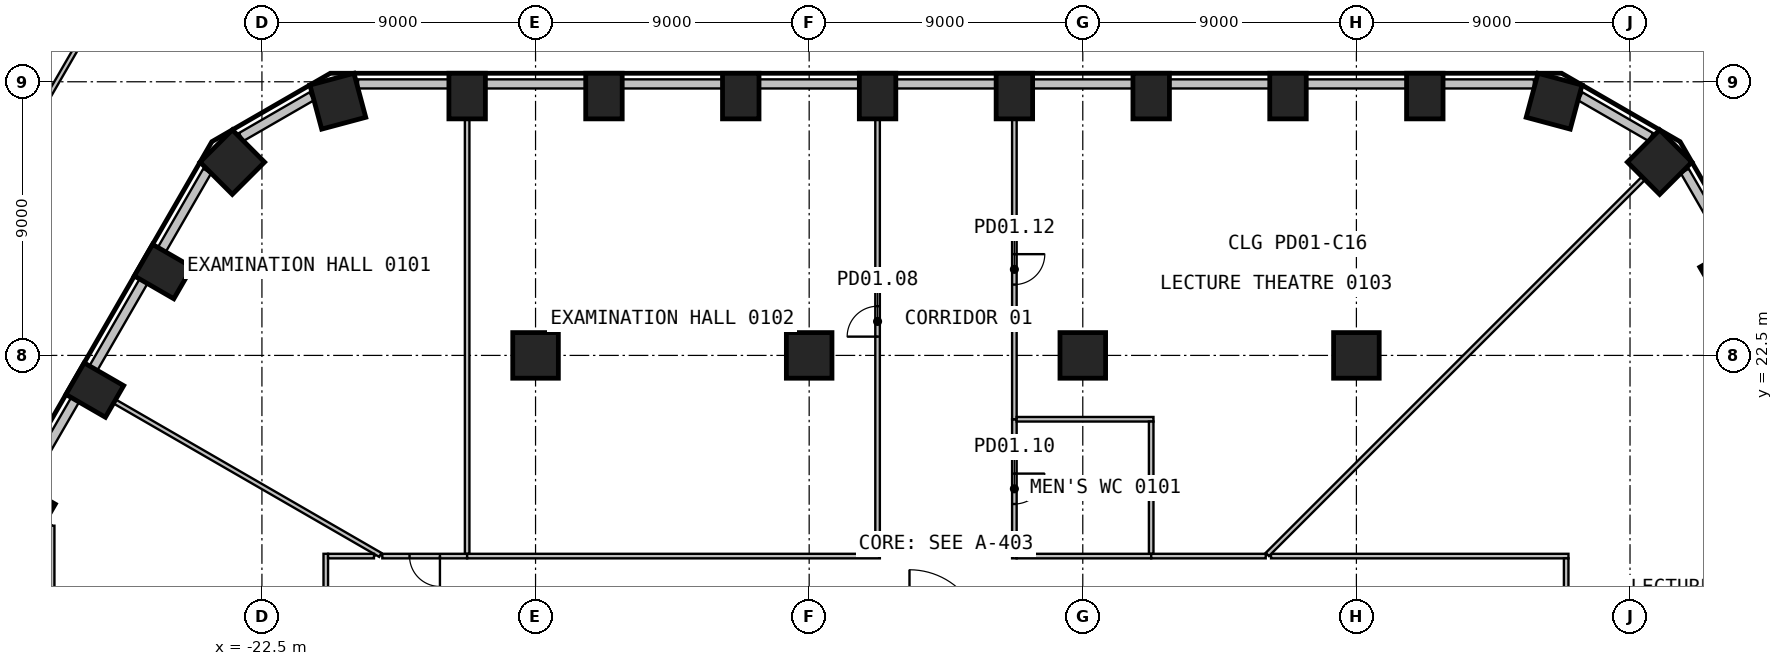
"""IFC4 building model, lengths in metres.
Left out: names, types, materials, properties, quantities, classifications, styles, units other than length and angle.
Written with IfcOpenShell. Run it as: python <this file> out.ifc"""

import sys

from ifc_helpers import new_model, si_unit, direction, frame, frame_2d, origin, origin_2d, place, context, subcontext, project, spatial, rectangle, circle, extrude, element, fill, save


model = new_model("IFC4")
c1 = context("Model", 3, precision=1e-05, world=origin(), true_north=direction((0.0, 1.0)))
c2 = subcontext(c1, "Body", "Model", "MODEL_VIEW")
j1 = project(units=[si_unit("LENGTHUNIT", "METRE"), si_unit("PLANEANGLEUNIT", "RADIAN")], contexts=[c1])
p1 = place(None, origin())
s1 = spatial("IfcSite", under=j1, at=p1, CompositionType="ELEMENT")
p2 = place(p1, origin())
s2 = spatial("IfcBuilding", under=s1, at=p2, CompositionType="ELEMENT")
p3 = place(p2, frame((0.0, 0.0, 6.0)))
s3 = spatial("IfcBuildingStorey", under=s2, at=p3, CompositionType="ELEMENT", Elevation=6.0)
p4 = place(p3, frame((25.748, 25.258, 0.0), z_axis=(0.0, 0.0, 1.0), x_axis=(-0.5, 0.866025403784, 0.0)))
e1 = element("IfcColumn", 1, at=p4, inside=s3, PredefinedType="COLUMN", context=c2, shape_type="SweptSolid", body=[
    extrude(rectangle(XDim=1.2, YDim=1.5, at=origin_2d()), origin(), (0.0, 0.0, 1.0), 4.4),
])
for number, where, z_axis, x_axis in (
    (2, (23.475, 28.857, 0.0), (0.0, 0.0, 1.0), (-0.707, 0.707, 0.0)),
    (3, (20.004, 30.861, 0.0), (0.0, 0.0, 1.0), (-0.966, 0.259, 0.0)),
):
    element("IfcColumn", number, at=place(p3, frame(where, z_axis=z_axis, x_axis=x_axis)), inside=s3, PredefinedType="COLUMN", context=c2, shape_type="SweptSolid", body=[
        extrude(rectangle(XDim=1.5, YDim=1.5, at=origin_2d()), origin(), (0.0, 0.0, 1.0), 4.4),
    ])
for number, where, z_axis, x_axis in (
    (4, (15.75, 31.03, 0.0), (0.0, 0.0, 1.0), (-1.0, 0.0, 0.0)),
    (5, (11.25, 31.03, 0.0), (0.0, 0.0, 1.0), (-1.0, 0.0, 0.0)),
    (6, (6.75, 31.03, 0.0), (0.0, 0.0, 1.0), (-1.0, 0.0, 0.0)),
    (7, (2.25, 31.03, 0.0), (0.0, 0.0, 1.0), (-1.0, 0.0, 0.0)),
    (8, (-2.25, 31.03, 0.0), (0.0, 0.0, 1.0), (-1.0, 0.0, 0.0)),
    (9, (-6.75, 31.03, 0.0), (0.0, 0.0, 1.0), (-1.0, 0.0, 0.0)),
    (10, (-11.25, 31.03, 0.0), (0.0, 0.0, 1.0), (-1.0, 0.0, 0.0)),
    (11, (-15.75, 31.03, 0.0), (0.0, 0.0, 1.0), (-1.0, 0.0, 0.0)),
):
    element("IfcColumn", number, at=place(p3, frame(where, z_axis=z_axis, x_axis=x_axis)), inside=s3, PredefinedType="COLUMN", context=c2, shape_type="SweptSolid", body=[
        extrude(rectangle(XDim=1.2, YDim=1.5, at=origin_2d()), origin(), (0.0, 0.0, 1.0), 4.4),
    ])
for number, where, z_axis, x_axis in (
    (12, (-20.004, 30.861, 0.0), (0.0, 0.0, 1.0), (-0.966, -0.259, 0.0)),
    (13, (-23.475, 28.857, 0.0), (0.0, 0.0, 1.0), (-0.707, -0.707, 0.0)),
):
    element("IfcColumn", number, at=place(p3, frame(where, z_axis=z_axis, x_axis=x_axis)), inside=s3, PredefinedType="COLUMN", context=c2, shape_type="SweptSolid", body=[
        extrude(rectangle(XDim=1.5, YDim=1.5, at=origin_2d()), origin(), (0.0, 0.0, 1.0), 4.4),
    ])
for number, where, z_axis, x_axis in (
    (14, (-25.748, 25.258, 0.0), (0.0, 0.0, 1.0), (-0.5, -0.866, 0.0)),
    (15, (-27.998, 21.361, 0.0), (0.0, 0.0, 1.0), (-0.5, -0.866, 0.0)),
    (16, (-30.248, 17.463, 0.0), (0.0, 0.0, 1.0), (-0.5, -0.866, 0.0)),
):
    element("IfcColumn", number, at=place(p3, frame(where, z_axis=z_axis, x_axis=x_axis)), inside=s3, PredefinedType="COLUMN", context=c2, shape_type="SweptSolid", body=[
        extrude(rectangle(XDim=1.2, YDim=1.5, at=origin_2d()), origin(), (0.0, 0.0, 1.0), 4.4),
    ])
for number, where, z_axis, x_axis in (
    (17, (-13.5, 22.5, 0.0), (0.0, 0.0, 1.0), (1.0, 0.0, 0.0)),
    (18, (-4.5, 22.5, 0.0), (0.0, 0.0, 1.0), (1.0, 0.0, 0.0)),
    (19, (4.5, 22.5, 0.0), (0.0, 0.0, 1.0), (1.0, 0.0, 0.0)),
    (20, (13.5, 22.5, 0.0), (0.0, 0.0, 1.0), (1.0, 0.0, 0.0)),
):
    element("IfcColumn", number, at=place(p3, frame(where, z_axis=z_axis, x_axis=x_axis)), inside=s3, PredefinedType="COLUMN", context=c2, shape_type="SweptSolid", body=[
        extrude(circle(Radius=0.75, at=origin_2d()), origin(), (0.0, 0.0, 1.0), 4.4),
    ])
p5 = place(p3, frame((25.794, 25.978, 0.0), z_axis=(0.0, 0.0, 1.0), x_axis=(-0.49999586137, 0.866027793211, 0.0)))
e21 = element("IfcWall", 21, at=p5, inside=s3, PredefinedType="SOLIDWALL", context=c2, shape_type="SweptSolid", body=[
    extrude(rectangle(XDim=2.989, YDim=0.3, at=frame_2d((1.494, 0.0))), origin(), (0.0, 0.0, 1.0), 4.4),
])
p6 = place(p3, frame((23.183, 29.682, 0.0), z_axis=(0.0, 0.0, 1.0), x_axis=(-0.866001915448, 0.500040680786, 0.0)))
e22 = element("IfcWall", 22, at=p6, inside=s3, PredefinedType="SOLIDWALL", context=c2, shape_type="SweptSolid", body=[
    extrude(rectangle(XDim=2.678, YDim=0.3, at=frame_2d((1.339, 0.0))), origin(), (0.0, 0.0, 1.0), 4.4),
])
p7 = place(p3, frame((19.339, 31.43, 0.0), z_axis=(0.0, 0.0, 1.0), x_axis=(-1.0, 0.0, 0.0)))
e23 = element("IfcWall", 23, at=p7, inside=s3, PredefinedType="SOLIDWALL", context=c2, shape_type="SweptSolid", body=[
    extrude(rectangle(XDim=2.989, YDim=0.3, at=frame_2d((1.494, 0.0))), origin(), (0.0, 0.0, 1.0), 4.4),
])
for number, where, z_axis, x_axis in (
    (24, (15.149, 31.43, 0.0), (0.0, 0.0, 1.0), (-1.0, 0.0, 0.0)),
    (25, (10.649, 31.43, 0.0), (0.0, 0.0, 1.0), (-1.0, 0.0, 0.0)),
    (26, (6.149, 31.43, 0.0), (0.0, 0.0, 1.0), (-1.0, 0.0, 0.0)),
    (27, (1.649, 31.43, 0.0), (0.0, 0.0, 1.0), (-1.0, 0.0, 0.0)),
    (28, (-2.851, 31.43, 0.0), (0.0, 0.0, 1.0), (-1.0, 0.0, 0.0)),
    (29, (-7.351, 31.43, 0.0), (0.0, 0.0, 1.0), (-1.0, 0.0, 0.0)),
    (30, (-11.851, 31.43, 0.0), (0.0, 0.0, 1.0), (-1.0, 0.0, 0.0)),
):
    element("IfcWall", number, at=place(p3, frame(where, z_axis=z_axis, x_axis=x_axis)), inside=s3, PredefinedType="SOLIDWALL", context=c2, shape_type="SweptSolid", body=[
        extrude(rectangle(XDim=3.299, YDim=0.3, at=frame_2d((1.649, 0.0))), origin(), (0.0, 0.0, 1.0), 4.4),
    ])
p8 = place(p3, frame((-16.351, 31.43, 0.0), z_axis=(0.0, 0.0, 1.0), x_axis=(-1.0, 0.0, 0.0)))
e31 = element("IfcWall", 31, at=p8, inside=s3, PredefinedType="SOLIDWALL", context=c2, shape_type="SweptSolid", body=[
    extrude(rectangle(XDim=2.989, YDim=0.3, at=frame_2d((1.494, 0.0))), origin(), (0.0, 0.0, 1.0), 4.4),
])
p9 = place(p3, frame((-20.864, 31.021, 0.0), z_axis=(0.0, 0.0, 1.0), x_axis=(-0.866001915448, -0.500040680786, 0.0)))
e32 = element("IfcWall", 32, at=p9, inside=s3, PredefinedType="SOLIDWALL", context=c2, shape_type="SweptSolid", body=[
    extrude(rectangle(XDim=2.678, YDim=0.3, at=frame_2d((1.339, 0.0))), origin(), (0.0, 0.0, 1.0), 4.4),
])
p10 = place(p3, frame((-24.299, 28.566, 0.0), z_axis=(0.0, 0.0, 1.0), x_axis=(-0.49999586137, -0.866027793211, 0.0)))
e33 = element("IfcWall", 33, at=p10, inside=s3, PredefinedType="SOLIDWALL", context=c2, shape_type="SweptSolid", body=[
    extrude(rectangle(XDim=2.989, YDim=0.3, at=frame_2d((1.494, 0.0))), origin(), (0.0, 0.0, 1.0), 4.4),
])
for number, where, z_axis, x_axis in (
    (34, (-26.394, 24.938, 0.0), (0.0, 0.0, 1.0), (-0.5, -0.866, 0.0)),
    (35, (-28.644, 21.041, 0.0), (0.0, 0.0, 1.0), (-0.5, -0.866, 0.0)),
):
    element("IfcWall", number, at=place(p3, frame(where, z_axis=z_axis, x_axis=x_axis)), inside=s3, PredefinedType="SOLIDWALL", context=c2, shape_type="SweptSolid", body=[
        extrude(rectangle(XDim=3.299, YDim=0.3, at=frame_2d((1.649, 0.0))), origin(), (0.0, 0.0, 1.0), 4.4),
    ])
p11 = place(p3, frame((-33.287, 24.501, 0.0), z_axis=(0.0, 0.0, 1.0), x_axis=(0.500064997195, 0.865987874384, 0.0)))
e36 = element("IfcWall", 36, at=p11, inside=s3, PredefinedType="PARTITIONING", context=c2, shape_type="SweptSolid", body=[
    extrude(rectangle(XDim=10.447, YDim=0.15, at=frame_2d((5.223, 0.0))), origin(), (0.0, 0.0, 1.0), 4.05),
])
p12 = place(p3, frame((-29.4, 16.899, 0.0), z_axis=(0.0, 0.0, 1.0), x_axis=(0.0, -1.0, 0.0)))
e37 = element("IfcWall", 37, at=p12, inside=s3, PredefinedType="PARTITIONING", context=c2, shape_type="SweptSolid", body=[
    extrude(rectangle(XDim=14.574, YDim=0.15, at=frame_2d((7.287, 0.0))), origin(), (0.0, 0.0, 1.0), 4.4),
])
p13 = place(p3, frame((-27.331, 20.976, 0.0), z_axis=(0.0, 0.0, 1.0), x_axis=(0.865988664976, -0.500063628085, 0.0)))
e38 = element("IfcWall", 38, at=p13, inside=s3, PredefinedType="PARTITIONING", context=c2, shape_type="SweptSolid", body=[
    extrude(rectangle(XDim=10.076, YDim=0.15, at=frame_2d((5.038, 0.0))), origin(), (0.0, 0.0, 1.0), 4.4),
])
p14 = place(p3, frame((-20.4, 15.975, 0.0), z_axis=(0.0, 0.0, 1.0), x_axis=(0.0, -1.0, 0.0)))
e39 = element("IfcWall", 39, at=p14, inside=s3, PredefinedType="PARTITIONING", context=c2, shape_type="SweptSolid", body=[
    extrude(rectangle(XDim=13.65, YDim=0.15, at=frame_2d((6.825, 0.0))), origin(), (0.0, 0.0, 1.0), 4.4),
])
p15 = place(p14, frame((6.325, 0.0, 0.0)))
e40 = element("IfcOpeningElement", 40, at=p15, cuts=e39, PredefinedType="OPENING", context=c2, shape_type="SweptSolid", body=[
    extrude(rectangle(XDim=1.0, YDim=2.1, at=frame_2d((0.5, 1.05))), frame((0.0, 0.085, 0.0), z_axis=(0.0, -1.0, 0.0), x_axis=(1.0, 0.0, 0.0)), (0.0, 0.0, 1.0), 0.17),
])
p16 = place(p3, frame((-18.815, 15.9, 0.0), z_axis=(0.0, 0.0, 1.0), x_axis=(-1.0, 0.0, 0.0)))
e41 = element("IfcWall", 41, at=p16, inside=s3, PredefinedType="PARTITIONING", context=c2, shape_type="SweptSolid", body=[
    extrude(rectangle(XDim=1.51, YDim=0.15, at=frame_2d((0.755, 0.0))), origin(), (0.0, 0.0, 1.0), 4.4),
])
p17 = place(p3, frame((-15.75, 15.9, 0.0), z_axis=(0.0, 0.0, 1.0), x_axis=(-1.0, 0.0, 0.0)))
e42 = element("IfcWall", 42, at=p17, inside=s3, PredefinedType="PARTITIONING", context=c2, shape_type="SweptSolid", body=[
    extrude(rectangle(XDim=2.79, YDim=0.15, at=frame_2d((1.395, 0.0))), origin(), (0.0, 0.0, 1.0), 4.4),
])
p18 = place(p17, frame((0.895, 0.0, 0.0)))
e43 = element("IfcOpeningElement", 43, at=p18, cuts=e42, PredefinedType="OPENING", context=c2, shape_type="SweptSolid", body=[
    extrude(rectangle(XDim=1.0, YDim=2.1, at=frame_2d((0.5, 1.05))), frame((0.0, 0.085, 0.0), z_axis=(0.0, -1.0, 0.0), x_axis=(1.0, 0.0, 0.0)), (0.0, 0.0, 1.0), 0.17),
])
p19 = place(p3, frame((-15.75, 30.26, 0.0), z_axis=(0.0, 0.0, 1.0), x_axis=(0.0, -1.0, 0.0)))
e44 = element("IfcWall", 44, at=p19, inside=s3, PredefinedType="PARTITIONING", context=c2, shape_type="SweptSolid", body=[
    extrude(rectangle(XDim=14.285, YDim=0.15, at=frame_2d((7.142, 0.0))), origin(), (0.0, 0.0, 1.0), 4.4),
])
p20 = place(p3, frame((-2.175, 15.9, 0.0), z_axis=(0.0, 0.0, 1.0), x_axis=(-1.0, 0.0, 0.0)))
e45 = element("IfcWall", 45, at=p20, inside=s3, PredefinedType="PARTITIONING", context=c2, shape_type="SweptSolid", body=[
    extrude(rectangle(XDim=13.575, YDim=0.15, at=frame_2d((6.788, 0.0))), origin(), (0.0, 0.0, 1.0), 4.4),
])
p21 = place(p3, frame((-2.25, 15.975, 0.0), z_axis=(0.0, 0.0, 1.0), x_axis=(0.0, 1.0, 0.0)))
e46 = element("IfcWall", 46, at=p21, inside=s3, PredefinedType="PARTITIONING", context=c2, shape_type="SweptSolid", body=[
    extrude(rectangle(XDim=14.285, YDim=0.15, at=frame_2d((7.142, 0.0))), origin(), (0.0, 0.0, 1.0), 4.4),
])
p22 = place(p21, frame((7.142, 0.0, 0.0)))
e47 = element("IfcOpeningElement", 47, at=p22, cuts=e46, PredefinedType="OPENING", context=c2, shape_type="SweptSolid", body=[
    extrude(rectangle(XDim=1.0, YDim=2.1, at=frame_2d((0.5, 1.05))), frame((0.0, 0.085, 0.0), z_axis=(0.0, -1.0, 0.0), x_axis=(1.0, 0.0, 0.0)), (0.0, 0.0, 1.0), 0.17),
])
p23 = place(p3, frame((2.25, 20.4, 0.0), z_axis=(0.0, 0.0, 1.0), x_axis=(0.0, -1.0, 0.0)))
e48 = element("IfcWall", 48, at=p23, inside=s3, PredefinedType="PARTITIONING", context=c2, shape_type="SweptSolid", body=[
    extrude(rectangle(XDim=4.575, YDim=0.15, at=frame_2d((2.288, 0.0))), origin(), (0.0, 0.0, 1.0), 4.4),
])
p24 = place(p23, frame((1.788, 0.0, 0.0)))
e49 = element("IfcOpeningElement", 49, at=p24, cuts=e48, PredefinedType="OPENING", context=c2, shape_type="SweptSolid", body=[
    extrude(rectangle(XDim=1.0, YDim=2.1, at=frame_2d((0.5, 1.05))), frame((0.0, 0.085, 0.0), z_axis=(0.0, -1.0, 0.0), x_axis=(1.0, 0.0, 0.0)), (0.0, 0.0, 1.0), 0.17),
])
p25 = place(p3, frame((6.75, 15.9, 0.0), z_axis=(0.0, 0.0, 1.0), x_axis=(-1.0, 0.0, 0.0)))
e50 = element("IfcWall", 50, at=p25, inside=s3, PredefinedType="PARTITIONING", context=c2, shape_type="SweptSolid", body=[
    extrude(rectangle(XDim=4.425, YDim=0.15, at=frame_2d((2.212, 0.0))), origin(), (0.0, 0.0, 1.0), 4.4),
])
p26 = place(p3, frame((2.25, 30.26, 0.0), z_axis=(0.0, 0.0, 1.0), x_axis=(0.0, -1.0, 0.0)))
e51 = element("IfcWall", 51, at=p26, inside=s3, PredefinedType="PARTITIONING", context=c2, shape_type="SweptSolid", body=[
    extrude(rectangle(XDim=9.86, YDim=0.15, at=frame_2d((4.93, 0.0))), origin(), (0.0, 0.0, 1.0), 4.4),
])
p27 = place(p26, frame((4.43, 0.0, 0.0)))
e52 = element("IfcOpeningElement", 52, at=p27, cuts=e51, PredefinedType="OPENING", context=c2, shape_type="SweptSolid", body=[
    extrude(rectangle(XDim=1.0, YDim=2.1, at=frame_2d((0.5, 1.05))), frame((0.0, 0.085, 0.0), z_axis=(0.0, -1.0, 0.0), x_axis=(1.0, 0.0, 0.0)), (0.0, 0.0, 1.0), 0.17),
])
p28 = place(p3, frame((2.325, 20.4, 0.0), z_axis=(0.0, 0.0, 1.0), x_axis=(1.0, 0.0, 0.0)))
e53 = element("IfcWall", 53, at=p28, inside=s3, PredefinedType="PARTITIONING", context=c2, shape_type="SweptSolid", body=[
    extrude(rectangle(XDim=4.5, YDim=0.15, at=frame_2d((2.25, 0.0))), origin(), (0.0, 0.0, 1.0), 4.4),
])
p29 = place(p3, frame((6.75, 20.325, 0.0), z_axis=(0.0, 0.0, 1.0), x_axis=(0.0, -1.0, 0.0)))
e54 = element("IfcWall", 54, at=p29, inside=s3, PredefinedType="PARTITIONING", context=c2, shape_type="SweptSolid", body=[
    extrude(rectangle(XDim=4.35, YDim=0.15, at=frame_2d((2.175, 0.0))), origin(), (0.0, 0.0, 1.0), 4.4),
])
p30 = place(p3, frame((10.517, 15.9, 0.0), z_axis=(0.0, 0.0, 1.0), x_axis=(-1.0, 0.0, 0.0)))
e55 = element("IfcWall", 55, at=p30, inside=s3, PredefinedType="PARTITIONING", context=c2, shape_type="SweptSolid", body=[
    extrude(rectangle(XDim=3.767, YDim=0.15, at=frame_2d((1.884, 0.0))), origin(), (0.0, 0.0, 1.0), 4.4),
])
p31 = place(p3, frame((20.475, 15.9, 0.0), z_axis=(0.0, 0.0, 1.0), x_axis=(-1.0, 0.0, 0.0)))
e56 = element("IfcWall", 56, at=p31, inside=s3, PredefinedType="PARTITIONING", context=c2, shape_type="SweptSolid", body=[
    extrude(rectangle(XDim=9.783, YDim=0.15, at=frame_2d((4.892, 0.0))), origin(), (0.0, 0.0, 1.0), 4.4),
])
p32 = place(p3, frame((22.93, 28.313, 0.0), z_axis=(0.0, 0.0, 1.0), x_axis=(-0.707106781187, -0.707106781187, 0.0)))
e57 = element("IfcWall", 57, at=p32, inside=s3, PredefinedType="PARTITIONING", context=c2, shape_type="SweptSolid", body=[
    extrude(rectangle(XDim=17.48, YDim=0.15, at=frame_2d((8.74, 0.0))), origin(), (0.0, 0.0, 1.0), 4.4),
])
p33 = place(p3, frame((20.4, 2.175, 0.0), z_axis=(0.0, 0.0, 1.0), x_axis=(0.0, 1.0, 0.0)))
e58 = element("IfcWall", 58, at=p33, inside=s3, PredefinedType="PARTITIONING", context=c2, shape_type="SweptSolid", body=[
    extrude(rectangle(XDim=13.65, YDim=0.15, at=frame_2d((6.825, 0.0))), origin(), (0.0, 0.0, 1.0), 4.4),
])
p34 = place(p33, frame((6.325, 0.0, 0.0)))
e59 = element("IfcOpeningElement", 59, at=p34, cuts=e58, PredefinedType="OPENING", context=c2, shape_type="SweptSolid", body=[
    extrude(rectangle(XDim=1.0, YDim=2.1, at=frame_2d((0.5, 1.05))), frame((0.0, 0.085, 0.0), z_axis=(0.0, -1.0, 0.0), x_axis=(1.0, 0.0, 0.0)), (0.0, 0.0, 1.0), 0.17),
])
p35 = place(p18, origin())
e60 = element("IfcDoor", 60, at=p35, inside=s3, OperationType="SINGLE_SWING_RIGHT", PredefinedType="DOOR", context=c2, shape_type="SweptSolid", body=[
    extrude(rectangle(XDim=1.0, YDim=2.1, at=frame_2d((0.5, 1.05))), frame((0.0, 0.025, 0.0), z_axis=(0.0, -1.0, 0.0), x_axis=(1.0, 0.0, 0.0)), (0.0, 0.0, 1.0), 0.05),
])
fill(e43, e60)
p36 = place(p22, origin())
e61 = element("IfcDoor", 61, at=p36, inside=s3, OperationType="SINGLE_SWING_LEFT", PredefinedType="DOOR", context=c2, shape_type="SweptSolid", body=[
    extrude(rectangle(XDim=1.0, YDim=2.1, at=frame_2d((0.5, 1.05))), frame((0.0, 0.025, 0.0), z_axis=(0.0, -1.0, 0.0), x_axis=(1.0, 0.0, 0.0)), (0.0, 0.0, 1.0), 0.05),
])
fill(e47, e61)
p37 = place(p24, origin())
e62 = element("IfcDoor", 62, at=p37, inside=s3, OperationType="SINGLE_SWING_LEFT", PredefinedType="DOOR", context=c2, shape_type="SweptSolid", body=[
    extrude(rectangle(XDim=1.0, YDim=2.1, at=frame_2d((0.5, 1.05))), frame((0.0, 0.025, 0.0), z_axis=(0.0, -1.0, 0.0), x_axis=(1.0, 0.0, 0.0)), (0.0, 0.0, 1.0), 0.05),
])
fill(e49, e62)
p38 = place(p27, origin())
e63 = element("IfcDoor", 63, at=p38, inside=s3, OperationType="SINGLE_SWING_RIGHT", PredefinedType="DOOR", context=c2, shape_type="SweptSolid", body=[
    extrude(rectangle(XDim=1.0, YDim=2.1, at=frame_2d((0.5, 1.05))), frame((0.0, 0.025, 0.0), z_axis=(0.0, -1.0, 0.0), x_axis=(1.0, 0.0, 0.0)), (0.0, 0.0, 1.0), 0.05),
])
fill(e52, e63)
save(model, sys.argv[1])
